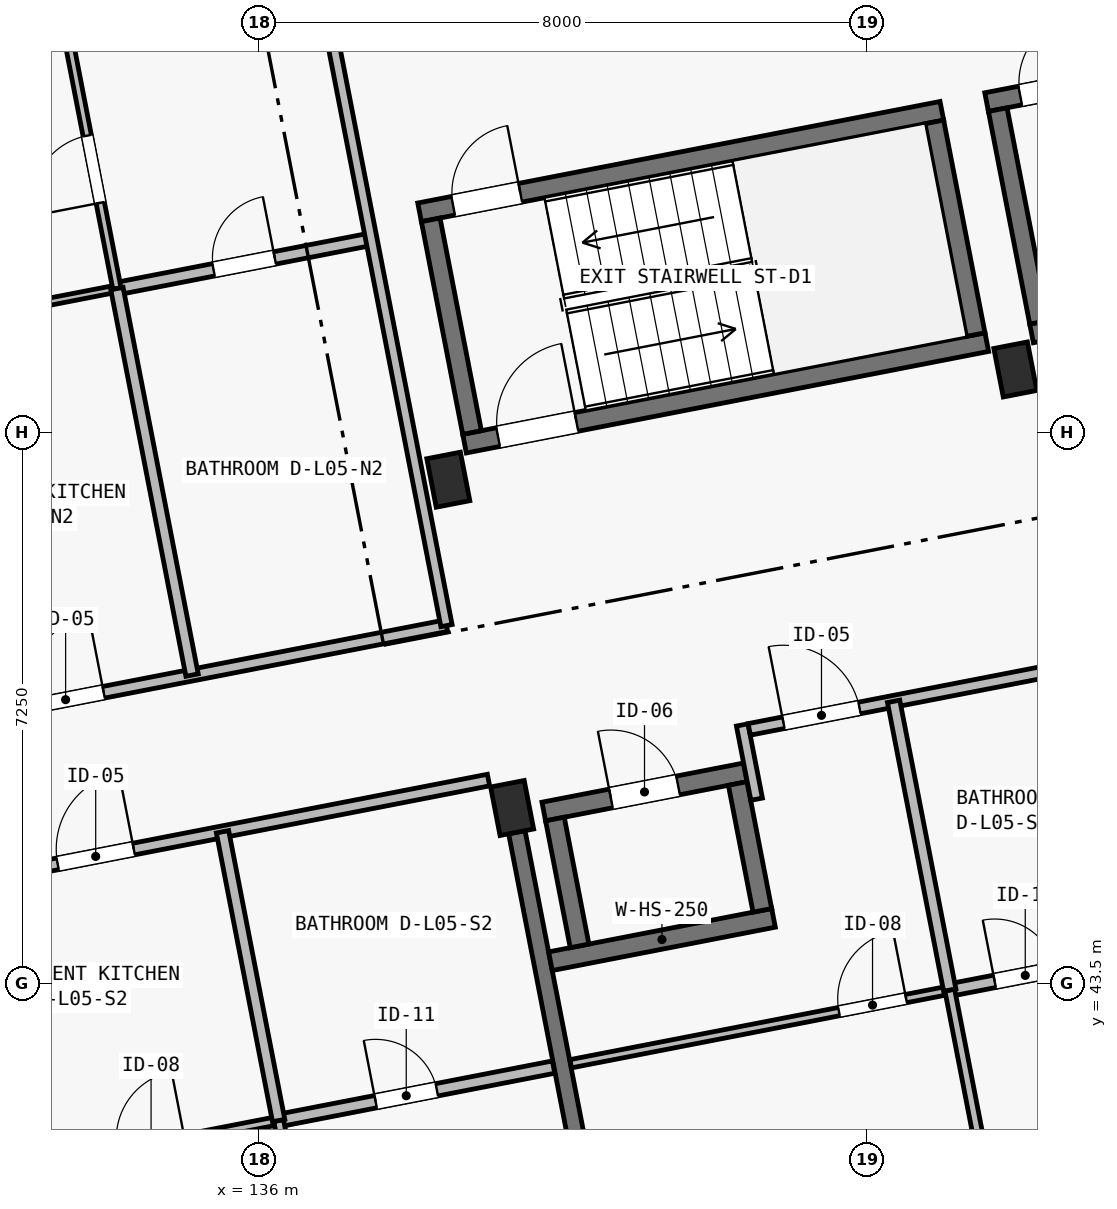
"""IFC4 building model, lengths in metres.
Left out: names, types, materials, properties, quantities, classifications, styles, units other than length and angle.
Written with IfcOpenShell. Run it as: python <this file> out.ifc"""

import sys

from ifc_helpers import new_model, si_unit, direction, frame, frame_2d, origin, origin_2d, place, context, subcontext, project, spatial, rectangle, extrude, element, fill, save


model = new_model("IFC4")
c1 = context("Model", 3, precision=1e-05, world=origin(), true_north=direction((0.0, 1.0)))
c2 = subcontext(c1, "Body", "Model", "MODEL_VIEW")
j1 = project(units=[si_unit("LENGTHUNIT", "METRE"), si_unit("PLANEANGLEUNIT", "RADIAN")], contexts=[c1])
p1 = place(None, origin())
s1 = spatial("IfcSite", under=j1, at=p1, CompositionType="ELEMENT")
p2 = place(p1, origin())
s2 = spatial("IfcBuilding", under=s1, at=p2, CompositionType="ELEMENT")
p3 = place(p2, frame((0.0, 0.0, 18.15)))
s3 = spatial("IfcBuildingStorey", under=s2, at=p3, CompositionType="ELEMENT", Elevation=18.15)
for number, where, z_axis, x_axis in (
    (1, (139.331, 45.811, 0.0), (0.0, 0.0, 1.0), (0.982, 0.191, 0.0)),
    (2, (138.491, 50.13, 0.0), (0.0, 0.0, 1.0), (0.982, 0.191, 0.0)),
    (3, (145.952, 51.58, 0.0), (0.0, 0.0, 1.0), (0.982, 0.191, 0.0)),
):
    element("IfcColumn", number, at=place(p3, frame(where, z_axis=z_axis, x_axis=x_axis)), inside=s3, PredefinedType="COLUMN", context=c2, shape_type="SweptSolid", body=[
        extrude(rectangle(XDim=0.45, YDim=0.65, at=origin_2d()), origin(), (0.0, 0.0, 1.0), 3.25),
    ])
p4 = place(p3, frame((133.259, 37.219, 0.0), z_axis=(0.0, 0.0, 1.0), x_axis=(-0.19081042584, 0.981626905393, 0.0)))
e4 = element("IfcWall", 4, at=p4, inside=s3, PredefinedType="SHEAR", context=c2, shape_type="SweptSolid", body=[
    extrude(rectangle(XDim=6.95, YDim=0.22, at=frame_2d((3.475, 0.0))), origin(), (0.0, 0.0, 1.0), 2.5),
])
p5 = place(p3, frame((140.719, 38.669, 0.0), z_axis=(0.0, 0.0, 1.0), x_axis=(-0.190783155939, 0.981632205773, 0.0)))
e5 = element("IfcWall", 5, at=p5, inside=s3, PredefinedType="SHEAR", context=c2, shape_type="SweptSolid", body=[
    extrude(rectangle(XDim=6.95, YDim=0.22, at=frame_2d((3.475, 0.0))), origin(), (0.0, 0.0, 1.0), 2.5),
])
p6 = place(p3, frame((138.113, 53.647, 0.0), z_axis=(0.0, 0.0, 1.0), x_axis=(0.981626097708, 0.19081458094, 0.0)))
e6 = element("IfcWall", 6, at=p6, inside=s3, PredefinedType="SHEAR", context=c2, shape_type="SweptSolid", body=[
    extrude(rectangle(XDim=7.0, YDim=0.25, at=frame_2d((3.5, 0.0))), origin(), (0.0, 0.0, 1.0), 3.25),
])
p7 = place(p6, frame((0.45, 0.0, 0.0)))
e7 = element("IfcOpeningElement", 7, at=p7, cuts=e6, PredefinedType="OPENING", context=c2, shape_type="SweptSolid", body=[
    extrude(rectangle(XDim=0.9, YDim=2.1, at=frame_2d((0.45, 1.05))), frame((0.0, 0.14, 0.0), z_axis=(0.0, -1.0, 0.0), x_axis=(1.0, 0.0, 0.0)), (0.0, 0.0, 1.0), 0.28),
])
p8 = place(p3, frame((138.705, 50.604, 0.0), z_axis=(0.0, 0.0, 1.0), x_axis=(0.981626097708, 0.19081458094, 0.0)))
e8 = element("IfcWall", 8, at=p8, inside=s3, PredefinedType="SHEAR", context=c2, shape_type="SweptSolid", body=[
    extrude(rectangle(XDim=7.0, YDim=0.25, at=frame_2d((3.5, 0.0))), origin(), (0.0, 0.0, 1.0), 3.25),
])
p9 = place(p8, frame((0.45, 0.0, 0.0)))
e9 = element("IfcOpeningElement", 9, at=p9, cuts=e8, PredefinedType="OPENING", context=c2, shape_type="SweptSolid", body=[
    extrude(rectangle(XDim=1.05, YDim=2.15, at=frame_2d((0.525, 1.075))), frame((0.0, 0.14, 0.0), z_axis=(0.0, -1.0, 0.0), x_axis=(1.0, 0.0, 0.0)), (0.0, 0.0, 1.0), 0.28),
])
p10 = place(p3, frame((138.804, 50.751, 0.0), z_axis=(0.0, 0.0, 1.0), x_axis=(-0.190858194834, 0.981617618762, 0.0)))
e10 = element("IfcWall", 10, at=p10, inside=s3, PredefinedType="SHEAR", context=c2, shape_type="SweptSolid", body=[
    extrude(rectangle(XDim=2.85, YDim=0.25, at=frame_2d((1.425, 0.0))), origin(), (0.0, 0.0, 1.0), 3.25),
])
p11 = place(p3, frame((145.43, 52.039, 0.0), z_axis=(0.0, 0.0, 1.0), x_axis=(-0.190842147128, 0.981620738819, 0.0)))
e11 = element("IfcWall", 11, at=p11, inside=s3, PredefinedType="SHEAR", context=c2, shape_type="SweptSolid", body=[
    extrude(rectangle(XDim=2.85, YDim=0.25, at=frame_2d((1.425, 0.0))), origin(), (0.0, 0.0, 1.0), 3.25),
])
p12 = place(p3, frame((145.574, 55.098, 0.0), z_axis=(0.0, 0.0, 1.0), x_axis=(0.981626097708, 0.19081458094, 0.0)))
e12 = element("IfcWall", 12, at=p12, inside=s3, PredefinedType="SHEAR", context=c2, shape_type="SweptSolid", body=[
    extrude(rectangle(XDim=7.0, YDim=0.25, at=frame_2d((3.5, 0.0))), origin(), (0.0, 0.0, 1.0), 3.25),
])
p13 = place(p12, frame((0.45, 0.0, 0.0)))
e13 = element("IfcOpeningElement", 13, at=p13, cuts=e12, PredefinedType="OPENING", context=c2, shape_type="SweptSolid", body=[
    extrude(rectangle(XDim=0.9, YDim=2.1, at=frame_2d((0.45, 1.05))), frame((0.0, 0.14, 0.0), z_axis=(0.0, -1.0, 0.0), x_axis=(1.0, 0.0, 0.0)), (0.0, 0.0, 1.0), 0.28),
])
p14 = place(p3, frame((146.165, 52.054, 0.0), z_axis=(0.0, 0.0, 1.0), x_axis=(0.981627367538, 0.190808048312, 0.0)))
e14 = element("IfcWall", 14, at=p14, inside=s3, PredefinedType="SHEAR", context=c2, shape_type="SweptSolid", body=[
    extrude(rectangle(XDim=7.0, YDim=0.25, at=frame_2d((3.5, 0.0))), origin(), (0.0, 0.0, 1.0), 3.25),
])
p15 = place(p14, frame((0.45, 0.0, 0.0)))
e15 = element("IfcOpeningElement", 15, at=p15, cuts=e14, PredefinedType="OPENING", context=c2, shape_type="SweptSolid", body=[
    extrude(rectangle(XDim=1.05, YDim=2.15, at=frame_2d((0.525, 1.075))), frame((0.0, 0.14, 0.0), z_axis=(0.0, -1.0, 0.0), x_axis=(1.0, 0.0, 0.0)), (0.0, 0.0, 1.0), 0.28),
])
p16 = place(p3, frame((146.264, 52.201, 0.0), z_axis=(0.0, 0.0, 1.0), x_axis=(-0.190775649797, 0.981633664584, 0.0)))
e16 = element("IfcWall", 16, at=p16, inside=s3, PredefinedType="SHEAR", context=c2, shape_type="SweptSolid", body=[
    extrude(rectangle(XDim=2.85, YDim=0.25, at=frame_2d((1.425, 0.0))), origin(), (0.0, 0.0, 1.0), 3.25),
])
p17 = place(p3, frame((139.835, 43.795, 0.0), z_axis=(0.0, 0.0, 1.0), x_axis=(0.981624737535, 0.190821578075, 0.0)))
e17 = element("IfcWall", 17, at=p17, inside=s3, PredefinedType="SHEAR", context=c2, shape_type="SweptSolid", body=[
    extrude(rectangle(XDim=2.99, YDim=0.25, at=frame_2d((1.495, 0.0))), origin(), (0.0, 0.0, 1.0), 3.25),
])
p18 = place(p3, frame((139.748, 45.764, 0.0), z_axis=(0.0, 0.0, 1.0), x_axis=(0.981630445883, 0.190792210834, 0.0)))
e18 = element("IfcWall", 18, at=p18, inside=s3, PredefinedType="SHEAR", context=c2, shape_type="SweptSolid", body=[
    extrude(rectangle(XDim=2.7, YDim=0.25, at=frame_2d((1.35, 0.0))), origin(), (0.0, 0.0, 1.0), 3.25),
])
p19 = place(p18, frame((0.9, 0.0, 0.0)))
e19 = element("IfcOpeningElement", 19, at=p19, cuts=e18, PredefinedType="OPENING", context=c2, shape_type="SweptSolid", body=[
    extrude(rectangle(XDim=0.9, YDim=2.05, at=frame_2d((0.45, 1.025))), frame((0.0, 0.14, 0.0), z_axis=(0.0, -1.0, 0.0), x_axis=(1.0, 0.0, 0.0)), (0.0, 0.0, 1.0), 0.28),
])
for number, where, z_axis, x_axis in (
    (20, (140.218, 43.997, 0.0), (0.0, 0.0, 1.0), (-0.191, 0.982, 0.0)),
    (21, (142.623, 44.464, 0.0), (0.0, 0.0, 1.0), (-0.191, 0.982, 0.0)),
):
    element("IfcWall", number, at=place(p3, frame(where, z_axis=z_axis, x_axis=x_axis)), inside=s3, PredefinedType="SHEAR", context=c2, shape_type="SweptSolid", body=[
        extrude(rectangle(XDim=1.7, YDim=0.25, at=frame_2d((0.85, 0.0))), origin(), (0.0, 0.0, 1.0), 3.25),
    ])
p20 = place(p3, frame((132.021, 44.818, 0.0), z_axis=(0.0, 0.0, 1.0), x_axis=(0.981629109582, 0.190799086008, 0.0)))
e22 = element("IfcWall", 22, at=p20, inside=s3, PredefinedType="PARTITIONING", context=c2, shape_type="SweptSolid", body=[
    extrude(rectangle(XDim=7.13, YDim=0.155, at=frame_2d((3.565, 0.0))), origin(), (0.0, 0.0, 1.0), 2.97),
])
p21 = place(p20, frame((1.355, 0.0, 0.0)))
e23 = element("IfcOpeningElement", 23, at=p21, cuts=e22, PredefinedType="OPENING", context=c2, shape_type="SweptSolid", body=[
    extrude(rectangle(XDim=1.02, YDim=2.2, at=frame_2d((0.51, 1.1))), frame((0.0, 0.093, 0.0), z_axis=(0.0, -1.0, 0.0), x_axis=(1.0, 0.0, 0.0)), (0.0, 0.0, 1.0), 0.185),
])
p22 = place(p3, frame((132.642, 40.996, 0.0), z_axis=(0.0, 0.0, 1.0), x_axis=(0.981626422232, 0.190812911449, 0.0)))
e24 = element("IfcWall", 24, at=p22, inside=s3, PredefinedType="PARTITIONING", context=c2, shape_type="SweptSolid", body=[
    extrude(rectangle(XDim=3.685, YDim=0.11, at=frame_2d((1.842, 0.0))), origin(), (0.0, 0.0, 1.0), 2.97),
])
p23 = place(p22, frame((1.525, 0.0, 0.0)))
e25 = element("IfcOpeningElement", 25, at=p23, cuts=e24, PredefinedType="OPENING", context=c2, shape_type="SweptSolid", body=[
    extrude(rectangle(XDim=0.9, YDim=2.1, at=frame_2d((0.45, 1.05))), frame((0.0, 0.07, 0.0), z_axis=(0.0, -1.0, 0.0), x_axis=(1.0, 0.0, 0.0)), (0.0, 0.0, 1.0), 0.14),
])
p24 = place(p3, frame((136.259, 41.699, 0.0), z_axis=(0.0, 0.0, 1.0), x_axis=(0.981628834294, 0.190800502313, 0.0)))
e26 = element("IfcWall", 26, at=p24, inside=s3, PredefinedType="PLUMBINGWALL", context=c2, shape_type="SweptSolid", body=[
    extrude(rectangle(XDim=3.685, YDim=0.165, at=frame_2d((1.843, 0.0))), origin(), (0.0, 0.0, 1.0), 2.97),
])
p25 = place(p24, frame((1.3, 0.0, 0.0)))
e27 = element("IfcOpeningElement", 27, at=p25, cuts=e26, PredefinedType="OPENING", context=c2, shape_type="SweptSolid", body=[
    extrude(rectangle(XDim=0.82, YDim=2.08, at=frame_2d((0.41, 1.04))), frame((0.0, 0.097, 0.0), z_axis=(0.0, -1.0, 0.0), x_axis=(1.0, 0.0, 0.0)), (0.0, 0.0, 1.0), 0.195),
])
p26 = place(p3, frame((137.125, 37.242, 0.0), z_axis=(0.0, 0.0, 1.0), x_axis=(-0.190787619192, 0.981631338316, 0.0)))
e28 = element("IfcWall", 28, at=p26, inside=s3, PredefinedType="PARTITIONING", context=c2, shape_type="SweptSolid", body=[
    extrude(rectangle(XDim=4.54, YDim=0.13, at=frame_2d((2.27, 0.0))), origin(), (0.0, 0.0, 1.0), 2.97),
])
p27 = place(p26, frame((1.35, 0.0, 0.0)))
e29 = element("IfcOpeningElement", 29, at=p27, cuts=e28, PredefinedType="OPENING", context=c2, shape_type="SweptSolid", body=[
    extrude(rectangle(XDim=0.88, YDim=2.1, at=frame_2d((0.44, 1.05))), frame((0.0, 0.08, 0.0), z_axis=(0.0, -1.0, 0.0), x_axis=(1.0, 0.0, 0.0)), (0.0, 0.0, 1.0), 0.16),
])
p28 = place(p3, frame((136.259, 41.699, 0.0), z_axis=(0.0, 0.0, 1.0), x_axis=(-0.190835887914, 0.981621955686, 0.0)))
e30 = element("IfcWall", 30, at=p28, inside=s3, PredefinedType="PLUMBINGWALL", context=c2, shape_type="SweptSolid", body=[
    extrude(rectangle(XDim=3.87, YDim=0.165, at=frame_2d((1.935, 0.0))), origin(), (0.0, 0.0, 1.0), 2.97),
])
p29 = place(p3, frame((142.548, 45.927, 0.0), z_axis=(0.0, 0.0, 1.0), x_axis=(-0.190639805817, 0.981660055436, 0.0)))
e31 = element("IfcWall", 31, at=p29, inside=s3, PredefinedType="PARTITIONING", context=c2, shape_type="SweptSolid", body=[
    extrude(rectangle(XDim=0.995, YDim=0.155, at=frame_2d((0.498, 0.0))), origin(), (0.0, 0.0, 1.0), 2.97),
])
p30 = place(p3, frame((142.451, 46.845, 0.0), z_axis=(0.0, 0.0, 1.0), x_axis=(0.981629934904, 0.190794839817, 0.0)))
e32 = element("IfcWall", 32, at=p30, inside=s3, PredefinedType="PARTITIONING", context=c2, shape_type="SweptSolid", body=[
    extrude(rectangle(XDim=4.105, YDim=0.155, at=frame_2d((2.052, 0.0))), origin(), (0.0, 0.0, 1.0), 2.97),
])
p31 = place(p30, frame((0.458, 0.0, 0.0)))
e33 = element("IfcOpeningElement", 33, at=p31, cuts=e32, PredefinedType="OPENING", context=c2, shape_type="SweptSolid", body=[
    extrude(rectangle(XDim=1.02, YDim=2.2, at=frame_2d((0.51, 1.1))), frame((0.0, 0.093, 0.0), z_axis=(0.0, -1.0, 0.0), x_axis=(1.0, 0.0, 0.0)), (0.0, 0.0, 1.0), 0.185),
])
p32 = place(p3, frame((140.102, 42.446, 0.0), z_axis=(0.0, 0.0, 1.0), x_axis=(0.981621892043, 0.19083621528, 0.0)))
e34 = element("IfcWall", 34, at=p32, inside=s3, PredefinedType="PARTITIONING", context=c2, shape_type="SweptSolid", body=[
    extrude(rectangle(XDim=5.08, YDim=0.11, at=frame_2d((2.54, 0.0))), origin(), (0.0, 0.0, 1.0), 2.97),
])
p33 = place(p32, frame((3.595, 0.0, 0.0)))
e35 = element("IfcOpeningElement", 35, at=p33, cuts=e34, PredefinedType="OPENING", context=c2, shape_type="SweptSolid", body=[
    extrude(rectangle(XDim=0.9, YDim=2.1, at=frame_2d((0.45, 1.05))), frame((0.0, 0.07, 0.0), z_axis=(0.0, -1.0, 0.0), x_axis=(1.0, 0.0, 0.0)), (0.0, 0.0, 1.0), 0.14),
])
p34 = place(p3, frame((145.089, 43.416, 0.0), z_axis=(0.0, 0.0, 1.0), x_axis=(0.981640351498, 0.190741239147, 0.0)))
e36 = element("IfcWall", 36, at=p34, inside=s3, PredefinedType="PLUMBINGWALL", context=c2, shape_type="SweptSolid", body=[
    extrude(rectangle(XDim=2.29, YDim=0.165, at=frame_2d((1.145, 0.0))), origin(), (0.0, 0.0, 1.0), 2.97),
])
p35 = place(p34, frame((0.602, 0.0, 0.0)))
e37 = element("IfcOpeningElement", 37, at=p35, cuts=e36, PredefinedType="OPENING", context=c2, shape_type="SweptSolid", body=[
    extrude(rectangle(XDim=0.82, YDim=2.08, at=frame_2d((0.41, 1.04))), frame((0.0, 0.097, 0.0), z_axis=(0.0, -1.0, 0.0), x_axis=(1.0, 0.0, 0.0)), (0.0, 0.0, 1.0), 0.195),
])
p36 = place(p3, frame((145.955, 38.959, 0.0), z_axis=(0.0, 0.0, 1.0), x_axis=(-0.190797690541, 0.981629380817, 0.0)))
e38 = element("IfcWall", 38, at=p36, inside=s3, PredefinedType="PARTITIONING", context=c2, shape_type="SweptSolid", body=[
    extrude(rectangle(XDim=4.54, YDim=0.13, at=frame_2d((2.27, 0.0))), origin(), (0.0, 0.0, 1.0), 2.97),
])
p37 = place(p36, frame((1.35, 0.0, 0.0)))
e39 = element("IfcOpeningElement", 39, at=p37, cuts=e38, PredefinedType="OPENING", context=c2, shape_type="SweptSolid", body=[
    extrude(rectangle(XDim=0.88, YDim=2.1, at=frame_2d((0.44, 1.05))), frame((0.0, 0.08, 0.0), z_axis=(0.0, -1.0, 0.0), x_axis=(1.0, 0.0, 0.0)), (0.0, 0.0, 1.0), 0.16),
])
p38 = place(p3, frame((145.089, 43.416, 0.0), z_axis=(0.0, 0.0, 1.0), x_axis=(-0.190835887914, 0.981621955686, 0.0)))
e40 = element("IfcWall", 40, at=p38, inside=s3, PredefinedType="PLUMBINGWALL", context=c2, shape_type="SweptSolid", body=[
    extrude(rectangle(XDim=3.87, YDim=0.165, at=frame_2d((1.935, 0.0))), origin(), (0.0, 0.0, 1.0), 2.97),
])
p39 = place(p3, frame((131.772, 46.909, 0.0), z_axis=(0.0, 0.0, 1.0), x_axis=(0.981622468528, 0.190833249935, 0.0)))
e41 = element("IfcWall", 41, at=p39, inside=s3, PredefinedType="PARTITIONING", context=c2, shape_type="SweptSolid", body=[
    extrude(rectangle(XDim=6.82, YDim=0.155, at=frame_2d((3.41, 0.0))), origin(), (0.0, 0.0, 1.0), 2.97),
])
p40 = place(p39, frame((1.205, 0.0, 0.0)))
e42 = element("IfcOpeningElement", 42, at=p40, cuts=e41, PredefinedType="OPENING", context=c2, shape_type="SweptSolid", body=[
    extrude(rectangle(XDim=1.02, YDim=2.2, at=frame_2d((0.51, 1.1))), frame((0.0, 0.093, 0.0), z_axis=(0.0, -1.0, 0.0), x_axis=(1.0, 0.0, 0.0)), (0.0, 0.0, 1.0), 0.185),
])
p41 = place(p3, frame((130.784, 51.994, 0.0), z_axis=(0.0, 0.0, 1.0), x_axis=(0.981629173664, 0.190798756314, 0.0)))
e43 = element("IfcWall", 43, at=p41, inside=s3, PredefinedType="PARTITIONING", context=c2, shape_type="SweptSolid", body=[
    extrude(rectangle(XDim=3.41, YDim=0.095, at=frame_2d((1.705, 0.0))), origin(), (0.0, 0.0, 1.0), 2.97),
])
p42 = place(p41, frame((1.255, 0.0, 0.0)))
e44 = element("IfcOpeningElement", 44, at=p42, cuts=e43, PredefinedType="OPENING", context=c2, shape_type="SweptSolid", body=[
    extrude(rectangle(XDim=0.9, YDim=2.1, at=frame_2d((0.45, 1.05))), frame((0.0, 0.062, 0.0), z_axis=(0.0, -1.0, 0.0), x_axis=(1.0, 0.0, 0.0)), (0.0, 0.0, 1.0), 0.125),
])
p43 = place(p3, frame((134.132, 52.644, 0.0), z_axis=(0.0, 0.0, 1.0), x_axis=(0.981629173664, 0.190798756314, 0.0)))
e45 = element("IfcWall", 45, at=p43, inside=s3, PredefinedType="PLUMBINGWALL", context=c2, shape_type="SweptSolid", body=[
    extrude(rectangle(XDim=3.41, YDim=0.165, at=frame_2d((1.705, 0.0))), origin(), (0.0, 0.0, 1.0), 2.97),
])
p44 = place(p43, frame((1.295, 0.0, 0.0)))
e46 = element("IfcOpeningElement", 46, at=p44, cuts=e45, PredefinedType="OPENING", context=c2, shape_type="SweptSolid", body=[
    extrude(rectangle(XDim=0.82, YDim=2.08, at=frame_2d((0.41, 1.04))), frame((0.0, 0.097, 0.0), z_axis=(0.0, -1.0, 0.0), x_axis=(1.0, 0.0, 0.0)), (0.0, 0.0, 1.0), 0.195),
])
p45 = place(p3, frame((134.132, 52.644, 0.0), z_axis=(0.0, 0.0, 1.0), x_axis=(-0.190837612577, 0.981621620394, 0.0)))
e47 = element("IfcWall", 47, at=p45, inside=s3, PredefinedType="PARTITIONING", context=c2, shape_type="SweptSolid", body=[
    extrude(rectangle(XDim=4.69, YDim=0.11, at=frame_2d((2.345, 0.0))), origin(), (0.0, 0.0, 1.0), 2.97),
])
p46 = place(p45, frame((1.15, 0.0, 0.0)))
e48 = element("IfcOpeningElement", 48, at=p46, cuts=e47, PredefinedType="OPENING", context=c2, shape_type="SweptSolid", body=[
    extrude(rectangle(XDim=0.9, YDim=2.1, at=frame_2d((0.45, 1.05))), frame((0.0, 0.07, 0.0), z_axis=(0.0, -1.0, 0.0), x_axis=(1.0, 0.0, 0.0)), (0.0, 0.0, 1.0), 0.14),
])
p47 = place(p3, frame((135.12, 47.559, 0.0), z_axis=(0.0, 0.0, 1.0), x_axis=(-0.190783877533, 0.981632065528, 0.0)))
e49 = element("IfcWall", 49, at=p47, inside=s3, PredefinedType="PLUMBINGWALL", context=c2, shape_type="SweptSolid", body=[
    extrude(rectangle(XDim=5.18, YDim=0.165, at=frame_2d((2.59, 0.0))), origin(), (0.0, 0.0, 1.0), 2.97),
])
p48 = place(p3, frame((138.467, 48.21, 0.0), z_axis=(0.0, 0.0, 1.0), x_axis=(-0.190814044018, 0.981626202078, 0.0)))
e50 = element("IfcWall", 50, at=p48, inside=s3, PredefinedType="PARTITIONING", context=c2, shape_type="SweptSolid", body=[
    extrude(rectangle(XDim=9.87, YDim=0.15, at=frame_2d((4.935, 0.0))), origin(), (0.0, 0.0, 1.0), 2.97),
])
p49 = place(p21, origin())
e51 = element("IfcDoor", 51, at=p49, inside=s3, OperationType="SINGLE_SWING_RIGHT", PredefinedType="DOOR", context=c2, shape_type="SweptSolid", body=[
    extrude(rectangle(XDim=1.02, YDim=2.2, at=frame_2d((0.51, 1.1))), frame((0.0, 0.025, 0.0), z_axis=(0.0, -1.0, 0.0), x_axis=(1.0, 0.0, 0.0)), (0.0, 0.0, 1.0), 0.05),
])
fill(e23, e51)
p50 = place(p25, origin())
e52 = element("IfcDoor", 52, at=p50, inside=s3, OperationType="SINGLE_SWING_LEFT", PredefinedType="DOOR", context=c2, shape_type="SweptSolid", body=[
    extrude(rectangle(XDim=0.82, YDim=2.08, at=frame_2d((0.41, 1.04))), frame((0.0, 0.025, 0.0), z_axis=(0.0, -1.0, 0.0), x_axis=(1.0, 0.0, 0.0)), (0.0, 0.0, 1.0), 0.05),
])
fill(e27, e52)
p51 = place(p31, origin())
e53 = element("IfcDoor", 53, at=p51, inside=s3, OperationType="SINGLE_SWING_LEFT", PredefinedType="DOOR", context=c2, shape_type="SweptSolid", body=[
    extrude(rectangle(XDim=1.02, YDim=2.2, at=frame_2d((0.51, 1.1))), frame((0.0, 0.025, 0.0), z_axis=(0.0, -1.0, 0.0), x_axis=(1.0, 0.0, 0.0)), (0.0, 0.0, 1.0), 0.05),
])
fill(e33, e53)
p52 = place(p33, origin())
e54 = element("IfcDoor", 54, at=p52, inside=s3, OperationType="SINGLE_SWING_RIGHT", PredefinedType="DOOR", context=c2, shape_type="SweptSolid", body=[
    extrude(rectangle(XDim=0.9, YDim=2.1, at=frame_2d((0.45, 1.05))), frame((0.0, 0.025, 0.0), z_axis=(0.0, -1.0, 0.0), x_axis=(1.0, 0.0, 0.0)), (0.0, 0.0, 1.0), 0.05),
])
fill(e35, e54)
p53 = place(p35, origin())
e55 = element("IfcDoor", 55, at=p53, inside=s3, OperationType="SINGLE_SWING_LEFT", PredefinedType="DOOR", context=c2, shape_type="SweptSolid", body=[
    extrude(rectangle(XDim=0.82, YDim=2.08, at=frame_2d((0.41, 1.04))), frame((0.0, 0.025, 0.0), z_axis=(0.0, -1.0, 0.0), x_axis=(1.0, 0.0, 0.0)), (0.0, 0.0, 1.0), 0.05),
])
fill(e37, e55)
p54 = place(p40, origin())
e56 = element("IfcDoor", 56, at=p54, inside=s3, OperationType="SINGLE_SWING_RIGHT", PredefinedType="DOOR", context=c2, shape_type="SweptSolid", body=[
    extrude(rectangle(XDim=1.02, YDim=2.2, at=frame_2d((0.51, 1.1))), frame((0.0, 0.025, 0.0), z_axis=(0.0, -1.0, 0.0), x_axis=(1.0, 0.0, 0.0)), (0.0, 0.0, 1.0), 0.05),
])
fill(e42, e56)
p55 = place(p44, origin())
e57 = element("IfcDoor", 57, at=p55, inside=s3, OperationType="SINGLE_SWING_RIGHT", PredefinedType="DOOR", context=c2, shape_type="SweptSolid", body=[
    extrude(rectangle(XDim=0.82, YDim=2.08, at=frame_2d((0.41, 1.04))), frame((0.0, 0.025, 0.0), z_axis=(0.0, -1.0, 0.0), x_axis=(1.0, 0.0, 0.0)), (0.0, 0.0, 1.0), 0.05),
])
fill(e46, e57)
p56 = place(p46, origin())
e58 = element("IfcDoor", 58, at=p56, inside=s3, OperationType="SINGLE_SWING_LEFT", PredefinedType="DOOR", context=c2, shape_type="SweptSolid", body=[
    extrude(rectangle(XDim=0.9, YDim=2.1, at=frame_2d((0.45, 1.05))), frame((0.0, 0.025, 0.0), z_axis=(0.0, -1.0, 0.0), x_axis=(1.0, 0.0, 0.0)), (0.0, 0.0, 1.0), 0.05),
])
fill(e48, e58)
p57 = place(p9, origin())
e59 = element("IfcDoor", 59, at=p57, inside=s3, OperationType="SINGLE_SWING_RIGHT", PredefinedType="DOOR", context=c2, shape_type="SweptSolid", body=[
    extrude(rectangle(XDim=1.05, YDim=2.15, at=frame_2d((0.525, 1.075))), frame((0.0, 0.025, 0.0), z_axis=(0.0, -1.0, 0.0), x_axis=(1.0, 0.0, 0.0)), (0.0, 0.0, 1.0), 0.05),
])
fill(e9, e59)
p58 = place(p7, origin())
e60 = element("IfcDoor", 60, at=p58, inside=s3, OperationType="SINGLE_SWING_RIGHT", PredefinedType="DOOR", context=c2, shape_type="SweptSolid", body=[
    extrude(rectangle(XDim=0.9, YDim=2.1, at=frame_2d((0.45, 1.05))), frame((0.0, 0.025, 0.0), z_axis=(0.0, -1.0, 0.0), x_axis=(1.0, 0.0, 0.0)), (0.0, 0.0, 1.0), 0.05),
])
fill(e7, e60)
p59 = place(p13, origin())
e61 = element("IfcDoor", 61, at=p59, inside=s3, OperationType="SINGLE_SWING_RIGHT", PredefinedType="DOOR", context=c2, shape_type="SweptSolid", body=[
    extrude(rectangle(XDim=0.9, YDim=2.1, at=frame_2d((0.45, 1.05))), frame((0.0, 0.025, 0.0), z_axis=(0.0, -1.0, 0.0), x_axis=(1.0, 0.0, 0.0)), (0.0, 0.0, 1.0), 0.05),
])
fill(e13, e61)
p60 = place(p19, origin())
e62 = element("IfcDoor", 62, at=p60, inside=s3, OperationType="SINGLE_SWING_LEFT", PredefinedType="DOOR", context=c2, shape_type="SweptSolid", body=[
    extrude(rectangle(XDim=0.9, YDim=2.05, at=frame_2d((0.45, 1.025))), frame((0.0, 0.025, 0.0), z_axis=(0.0, -1.0, 0.0), x_axis=(1.0, 0.0, 0.0)), (0.0, 0.0, 1.0), 0.05),
])
fill(e19, e62)
save(model, sys.argv[1])
